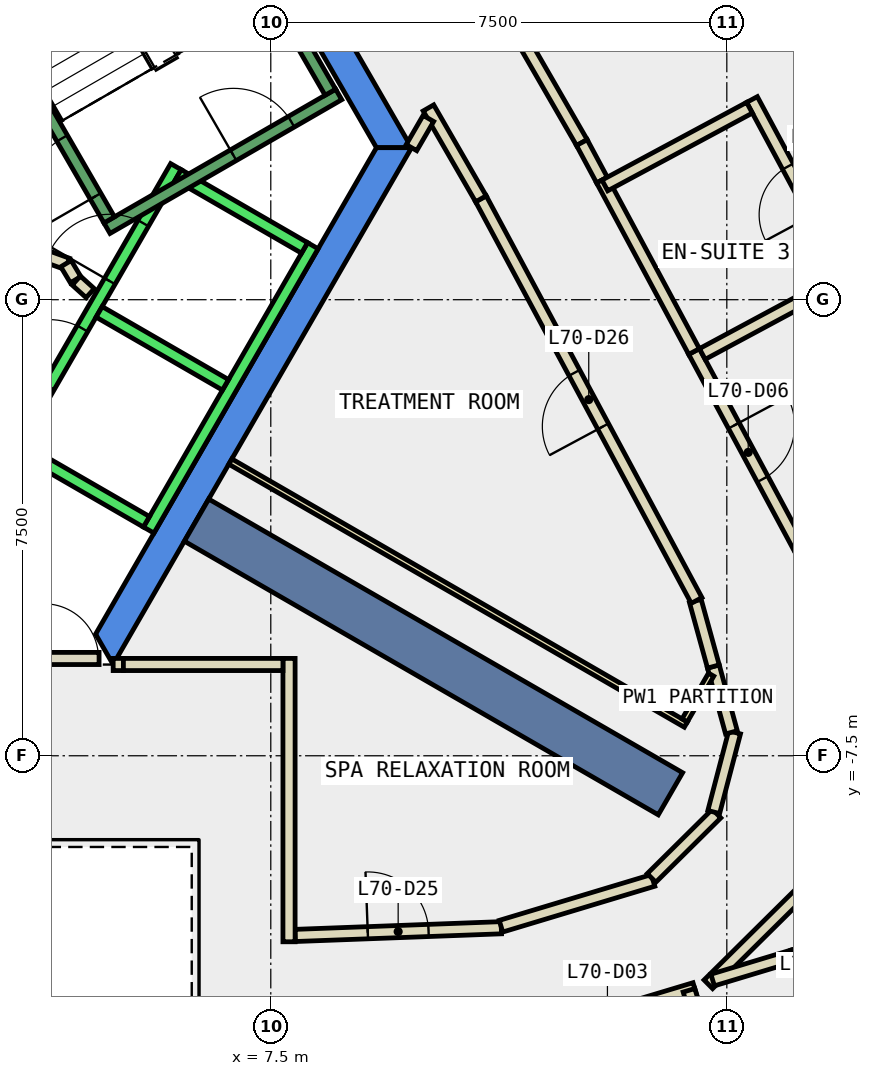
"""IFC4 building model, lengths in metres.
Left out: names, types, materials, properties, quantities, classifications, styles, units other than length and angle.
Written with IfcOpenShell. Run it as: python <this file> out.ifc"""

import sys

from ifc_helpers import new_model, si_unit, direction, frame, frame_2d, origin, place, context, subcontext, project, spatial, polyline, rectangle, outline, extrude, element, fill, save


model = new_model("IFC4")
c1 = context("Model", 3, precision=1e-05, world=origin(), true_north=direction((0.0, 1.0)))
c2 = subcontext(c1, "Body", "Model", "MODEL_VIEW")
j1 = project(units=[si_unit("LENGTHUNIT", "METRE"), si_unit("PLANEANGLEUNIT", "RADIAN")], contexts=[c1])
p1 = place(None, origin())
s1 = spatial("IfcSite", under=j1, at=p1, CompositionType="ELEMENT")
p2 = place(p1, origin())
s2 = spatial("IfcBuilding", under=s1, at=p2, CompositionType="ELEMENT")
p3 = place(p2, frame((0.0, 0.0, 300.8)))
s3 = spatial("IfcBuildingStorey", under=s2, at=p3, CompositionType="ELEMENT", Elevation=300.8)
p4 = place(p3, frame((0.0, 0.0, -0.34)))
e1 = element("IfcWall", 1, at=p4, inside=s3, PredefinedType="SHEAR", context=c2, shape_type="SweptSolid", body=[
    extrude(outline(polyline([(5.486, 9.998), (5.053, 9.748), (9.238, 2.5), (9.815, 2.5), (5.486, 9.998)])), origin(), (0.0, 0.0, 1.0), 3.6),
])
p5 = place(p3, frame((0.0, 0.0, -0.34)))
e2 = element("IfcWall", 2, at=p5, inside=s3, PredefinedType="SHEAR", context=c2, shape_type="SweptSolid", body=[
    extrude(outline(polyline([(4.907, -6.0), (9.815, 2.5), (9.238, 2.5), (4.619, -5.5), (4.907, -6.0)])), origin(), (0.0, 0.0, 1.0), 3.6),
])
p6 = place(p3, frame((6.279, -3.625, -0.34), z_axis=(0.0, 0.0, 1.0), x_axis=(0.866017533419, -0.500013631625, 0.0)))
e3 = element("IfcWall", 3, at=p6, inside=s3, PredefinedType="SHEAR", context=c2, shape_type="SweptSolid", body=[
    extrude(rectangle(XDim=9.0, YDim=0.8, at=frame_2d((4.5, 0.0))), origin(), (0.0, 0.0, 1.0), 3.6),
])
p7 = place(p3, frame((7.9, -10.455, 0.0), z_axis=(0.0, 0.0, 1.0), x_axis=(0.999297278907, 0.037482640915, 0.0)))
e4 = element("IfcWall", 4, at=p7, inside=s3, PredefinedType="PARTITIONING", context=c2, shape_type="SweptSolid", body=[
    extrude(rectangle(XDim=3.394, YDim=0.2, at=frame_2d((1.697, 0.0))), origin(), (0.0, 0.0, 1.0), 3.26),
])
p8 = place(p7, frame((1.196, 0.0, 0.0)))
e5 = element("IfcOpeningElement", 5, at=p8, cuts=e4, PredefinedType="OPENING", context=c2, shape_type="SweptSolid", body=[
    extrude(rectangle(XDim=1.0, YDim=2.1, at=frame_2d((0.5, 1.05))), frame((0.0, 0.11, 0.0), z_axis=(0.0, -1.0, 0.0), x_axis=(1.0, 0.0, 0.0)), (0.0, 0.0, 1.0), 0.22),
])
p9 = place(p3, frame((11.286, -10.303, 0.0), z_axis=(0.0, 0.0, 1.0), x_axis=(0.957555754851, 0.288248115955, 0.0)))
e6 = element("IfcWall", 6, at=p9, inside=s3, PredefinedType="PARTITIONING", context=c2, shape_type="SweptSolid", body=[
    extrude(rectangle(XDim=2.612, YDim=0.2, at=frame_2d((1.306, 0.0))), origin(), (0.0, 0.0, 1.0), 3.26),
])
p10 = place(p3, frame((13.762, -9.509, 0.0), z_axis=(0.0, 0.0, 1.0), x_axis=(0.710749293824, 0.703445407497, 0.0)))
e7 = element("IfcWall", 7, at=p10, inside=s3, PredefinedType="PARTITIONING", context=c2, shape_type="SweptSolid", body=[
    extrude(rectangle(XDim=1.504, YDim=0.2, at=frame_2d((0.752, 0.0))), origin(), (0.0, 0.0, 1.0), 3.26),
])
p11 = place(p3, frame((14.785, -8.425, 0.0), z_axis=(0.0, 0.0, 1.0), x_axis=(0.253295121261, 0.967389053869, 0.0)))
e8 = element("IfcWall", 8, at=p11, inside=s3, PredefinedType="PARTITIONING", context=c2, shape_type="SweptSolid", body=[
    extrude(rectangle(XDim=1.354, YDim=0.2, at=frame_2d((0.677, 0.0))), origin(), (0.0, 0.0, 1.0), 3.26),
])
p12 = place(p3, frame((15.076, -7.115, 0.0), z_axis=(0.0, 0.0, 1.0), x_axis=(-0.264368116744, 0.964421846937, 0.0)))
e9 = element("IfcWall", 9, at=p12, inside=s3, PredefinedType="PARTITIONING", context=c2, shape_type="SweptSolid", body=[
    extrude(rectangle(XDim=1.123, YDim=0.2, at=frame_2d((0.562, 0.0))), origin(), (0.0, 0.0, 1.0), 3.26),
])
p13 = place(p3, frame((14.779, -6.032, 0.0), z_axis=(0.0, 0.0, 1.0), x_axis=(-0.265740072272, 0.964044715762, 0.0)))
e10 = element("IfcWall", 10, at=p13, inside=s3, PredefinedType="PARTITIONING", context=c2, shape_type="SweptSolid", body=[
    extrude(rectangle(XDim=1.118, YDim=0.2, at=frame_2d((0.559, 0.0))), origin(), (0.0, 0.0, 1.0), 3.26),
])
p14 = place(p3, frame((14.503, -4.946, 0.0), z_axis=(0.0, 0.0, 1.0), x_axis=(-0.473101362557, 0.881008002658, 0.0)))
e11 = element("IfcWall", 11, at=p14, inside=s3, PredefinedType="PARTITIONING", context=c2, shape_type="SweptSolid", body=[
    extrude(rectangle(XDim=7.497, YDim=0.2, at=frame_2d((3.749, 0.0))), origin(), (0.0, 0.0, 1.0), 3.26),
])
p15 = place(p14, frame((3.249, 0.0, 0.0)))
e12 = element("IfcOpeningElement", 12, at=p15, cuts=e11, PredefinedType="OPENING", context=c2, shape_type="SweptSolid", body=[
    extrude(rectangle(XDim=1.0, YDim=2.1, at=frame_2d((0.5, 1.05))), frame((0.0, 0.11, 0.0), z_axis=(0.0, -1.0, 0.0), x_axis=(1.0, 0.0, 0.0)), (0.0, 0.0, 1.0), 0.22),
])
p16 = place(p3, frame((10.956, 1.659, 0.0), z_axis=(0.0, 0.0, 1.0), x_axis=(-0.49992648901, 0.866067841215, 0.0)))
e13 = element("IfcWall", 13, at=p16, inside=s3, PredefinedType="PARTITIONING", context=c2, shape_type="SweptSolid", body=[
    extrude(rectangle(XDim=1.726, YDim=0.2, at=frame_2d((0.863, 0.0))), origin(), (0.0, 0.0, 1.0), 3.26),
])
p17 = place(p3, frame((10.092, 2.981, 0.0), z_axis=(0.0, 0.0, 1.0), x_axis=(-0.501296484717, -0.865275582927, 0.0)))
e14 = element("IfcWall", 14, at=p17, inside=s3, PredefinedType="PARTITIONING", context=c2, shape_type="SweptSolid", body=[
    extrude(rectangle(XDim=0.555, YDim=0.2, at=frame_2d((0.277, 0.0))), origin(), (0.0, 0.0, 1.0), 3.26),
])
p18 = place(p3, frame((14.473, -11.328, 0.0), z_axis=(0.0, 0.0, 1.0), x_axis=(-0.957599689503, -0.288102125406, 0.0)))
e15 = element("IfcWall", 15, at=p18, inside=s3, PredefinedType="PARTITIONING", context=c2, shape_type="SweptSolid", body=[
    extrude(rectangle(XDim=2.999, YDim=0.2, at=frame_2d((1.5, 0.0))), origin(), (0.0, 0.0, 1.0), 3.26),
])
p19 = place(p18, frame((1.0, 0.0, 0.0)))
e16 = element("IfcOpeningElement", 16, at=p19, cuts=e15, PredefinedType="OPENING", context=c2, shape_type="SweptSolid", body=[
    extrude(rectangle(XDim=1.0, YDim=2.1, at=frame_2d((0.5, 1.05))), frame((0.0, 0.11, 0.0), z_axis=(0.0, -1.0, 0.0), x_axis=(1.0, 0.0, 0.0)), (0.0, 0.0, 1.0), 0.22),
])
p20 = place(p3, frame((16.537, -9.436, 0.0), z_axis=(0.0, 0.0, 1.0), x_axis=(-0.710773151724, -0.703421301063, 0.0)))
e17 = element("IfcWall", 17, at=p20, inside=s3, PredefinedType="PARTITIONING", context=c2, shape_type="SweptSolid", body=[
    extrude(rectangle(XDim=2.59, YDim=0.2, at=frame_2d((1.295, 0.0))), origin(), (0.0, 0.0, 1.0), 3.26),
])
p21 = place(p3, frame((14.461, -0.852, 0.0), z_axis=(0.0, 0.0, 1.0), x_axis=(0.473160180459, -0.88097641491, 0.0)))
e18 = element("IfcWall", 18, at=p21, inside=s3, PredefinedType="PARTITIONING", context=c2, shape_type="SweptSolid", body=[
    extrude(rectangle(XDim=3.766, YDim=0.2, at=frame_2d((1.883, 0.0))), origin(), (0.0, 0.0, 1.0), 3.26),
])
p22 = place(p21, frame((1.383, 0.0, 0.0)))
e19 = element("IfcOpeningElement", 19, at=p22, cuts=e18, PredefinedType="OPENING", context=c2, shape_type="SweptSolid", body=[
    extrude(rectangle(XDim=1.0, YDim=2.1, at=frame_2d((0.5, 1.05))), frame((0.0, 0.11, 0.0), z_axis=(0.0, -1.0, 0.0), x_axis=(1.0, 0.0, 0.0)), (0.0, 0.0, 1.0), 0.22),
])
p23 = place(p3, frame((10.618, 6.044, 0.0), z_axis=(0.0, 0.0, 1.0), x_axis=(0.50008212199, -0.86597798544, 0.0)))
e20 = element("IfcWall", 20, at=p23, inside=s3, PredefinedType="PARTITIONING", context=c2, shape_type="SweptSolid", body=[
    extrude(rectangle(XDim=3.995, YDim=0.2, at=frame_2d((1.998, 0.0))), origin(), (0.0, 0.0, 1.0), 3.26),
])
p24 = place(p3, frame((12.616, 2.584, 0.0), z_axis=(0.0, 0.0, 1.0), x_axis=(0.472830911699, -0.881153181315, 0.0)))
e21 = element("IfcWall", 21, at=p24, inside=s3, PredefinedType="PARTITIONING", context=c2, shape_type="SweptSolid", body=[
    extrude(rectangle(XDim=0.7, YDim=0.2, at=frame_2d((0.35, 0.0))), origin(), (0.0, 0.0, 1.0), 3.26),
])
p25 = place(p3, frame((12.947, 1.967, 0.0), z_axis=(0.0, 0.0, 1.0), x_axis=(0.473116768279, -0.88099972961, 0.0)))
e22 = element("IfcWall", 22, at=p25, inside=s3, PredefinedType="PARTITIONING", context=c2, shape_type="SweptSolid", body=[
    extrude(rectangle(XDim=3.2, YDim=0.2, at=frame_2d((1.6, 0.0))), origin(), (0.0, 0.0, 1.0), 3.26),
])
p26 = place(p3, frame((3.838, 0.702, 0.0), z_axis=(0.0, 0.0, 1.0), x_axis=(0.941035081519, -0.338308993895, 0.0)))
e23 = element("IfcWall", 23, at=p26, inside=s3, PredefinedType="PARTITIONING", context=c2, shape_type="SweptSolid", body=[
    extrude(rectangle(XDim=0.337, YDim=0.2, at=frame_2d((0.168, 0.0))), origin(), (0.0, 0.0, 1.0), 3.26),
])
p27 = place(p3, frame((4.132, 0.593, 0.0), z_axis=(0.0, 0.0, 1.0), x_axis=(0.513561617048, -0.858052717201, 0.0)))
e24 = element("IfcWall", 24, at=p27, inside=s3, PredefinedType="PARTITIONING", context=c2, shape_type="SweptSolid", body=[
    extrude(rectangle(XDim=0.308, YDim=0.2, at=frame_2d((0.154, 0.0))), origin(), (0.0, 0.0, 1.0), 3.26),
])
p28 = place(p3, frame((4.301, 0.315, 0.0), z_axis=(0.0, 0.0, 1.0), x_axis=(0.741798017506, -0.670623367639, 0.0)))
e25 = element("IfcWall", 25, at=p28, inside=s3, PredefinedType="PARTITIONING", context=c2, shape_type="SweptSolid", body=[
    extrude(rectangle(XDim=0.309, YDim=0.2, at=frame_2d((0.154, 0.0))), origin(), (0.0, 0.0, 1.0), 3.26),
])
p29 = place(p3, frame((4.908, -5.999, 0.0), z_axis=(0.0, 0.0, 1.0), x_axis=(1.0, 0.0, 0.0)))
e26 = element("IfcWall", 26, at=p29, inside=s3, PredefinedType="PARTITIONING", context=c2, shape_type="SweptSolid", body=[
    extrude(rectangle(XDim=0.168, YDim=0.2, at=frame_2d((0.084, 0.0))), origin(), (0.0, 0.0, 1.0), 2.4),
])
p30 = place(p3, frame((7.8, -5.899, 0.0), z_axis=(0.0, 0.0, 1.0), x_axis=(0.0, -1.0, 0.0)))
e27 = element("IfcWall", 27, at=p30, inside=s3, PredefinedType="PARTITIONING", context=c2, shape_type="SweptSolid", body=[
    extrude(rectangle(XDim=4.66, YDim=0.2, at=frame_2d((2.33, 0.0))), origin(), (0.0, 0.0, 1.0), 3.26),
])
p31 = place(p3, frame((6.835, -2.662, 0.0), z_axis=(0.0, 0.0, 1.0), x_axis=(0.866023427642, -0.500003422764, 0.0)))
e28 = element("IfcWall", 28, at=p31, inside=s3, PredefinedType="PARTITIONING", context=c2, shape_type="SweptSolid", body=[
    extrude(rectangle(XDim=8.65, YDim=0.1, at=frame_2d((4.325, 0.0))), origin(), (0.0, 0.0, 1.0), 3.26),
])
p32 = place(p3, frame((14.307, -6.919, 0.0), z_axis=(0.0, 0.0, 1.0), x_axis=(0.500305662732, 0.865848857387, 0.0)))
e29 = element("IfcWall", 29, at=p32, inside=s3, PredefinedType="PARTITIONING", context=c2, shape_type="SweptSolid", body=[
    extrude(rectangle(XDim=0.87, YDim=0.1, at=frame_2d((0.435, 0.0))), origin(), (0.0, 0.0, 1.0), 3.26),
])
p33 = place(p3, frame((14.378, -11.357, 0.0), z_axis=(0.0, 0.0, 1.0), x_axis=(0.287932252498, -0.957650780802, 0.0)))
e30 = element("IfcWall", 30, at=p33, inside=s3, PredefinedType="PARTITIONING", context=c2, shape_type="SweptSolid", body=[
    extrude(rectangle(XDim=2.3, YDim=0.2, at=frame_2d((1.15, 0.0))), origin(), (0.0, 0.0, 1.0), 3.26),
])
p34 = place(p3, frame((16.917, -13.203, 0.0), z_axis=(0.0, 0.0, 1.0), x_axis=(-0.287998855134, 0.957630753183, 0.0)))
e31 = element("IfcWall", 31, at=p34, inside=s3, PredefinedType="PARTITIONING", context=c2, shape_type="SweptSolid", body=[
    extrude(rectangle(XDim=2.649, YDim=0.2, at=frame_2d((1.325, 0.0))), origin(), (0.0, 0.0, 1.0), 3.26),
])
p35 = place(p34, frame((0.875, 0.0, 0.0)))
e32 = element("IfcOpeningElement", 32, at=p35, cuts=e31, PredefinedType="OPENING", context=c2, shape_type="SweptSolid", body=[
    extrude(rectangle(XDim=0.9, YDim=2.1, at=frame_2d((0.45, 1.05))), frame((0.0, 0.11, 0.0), z_axis=(0.0, -1.0, 0.0), x_axis=(1.0, 0.0, 0.0)), (0.0, 0.0, 1.0), 0.22),
])
p36 = place(p3, frame((16.087, -10.79, 0.0), z_axis=(0.0, 0.0, 1.0), x_axis=(-0.957425655367, -0.288679951581, 0.0)))
e33 = element("IfcWall", 33, at=p36, inside=s3, PredefinedType="PARTITIONING", context=c2, shape_type="SweptSolid", body=[
    extrude(rectangle(XDim=1.378, YDim=0.2, at=frame_2d((0.689, 0.0))), origin(), (0.0, 0.0, 1.0), 3.26),
])
p37 = place(p3, frame((14.597, -0.893, 0.0), z_axis=(0.0, 0.0, 1.0), x_axis=(0.880971229432, 0.473169835168, 0.0)))
e34 = element("IfcWall", 34, at=p37, inside=s3, PredefinedType="PARTITIONING", context=c2, shape_type="SweptSolid", body=[
    extrude(rectangle(XDim=2.599, YDim=0.2, at=frame_2d((1.3, 0.0))), origin(), (0.0, 0.0, 1.0), 3.26),
])
p38 = place(p3, frame((17.023, 0.297, 0.0), z_axis=(0.0, 0.0, 1.0), x_axis=(-0.473247398557, 0.88092956572, 0.0)))
e35 = element("IfcWall", 35, at=p38, inside=s3, PredefinedType="PARTITIONING", context=c2, shape_type="SweptSolid", body=[
    extrude(rectangle(XDim=3.4, YDim=0.2, at=frame_2d((1.7, 0.0))), origin(), (0.0, 0.0, 1.0), 3.26),
])
p39 = place(p38, frame((1.25, 0.0, 0.0)))
e36 = element("IfcOpeningElement", 36, at=p39, cuts=e35, PredefinedType="OPENING", context=c2, shape_type="SweptSolid", body=[
    extrude(rectangle(XDim=0.9, YDim=2.1, at=frame_2d((0.45, 1.05))), frame((0.0, 0.11, 0.0), z_axis=(0.0, -1.0, 0.0), x_axis=(1.0, 0.0, 0.0)), (0.0, 0.0, 1.0), 0.22),
])
p40 = place(p3, frame((15.373, 3.157, 0.0), z_axis=(0.0, 0.0, 1.0), x_axis=(-0.880935111027, -0.473237076062, 0.0)))
e37 = element("IfcWall", 37, at=p40, inside=s3, PredefinedType="PARTITIONING", context=c2, shape_type="SweptSolid", body=[
    extrude(rectangle(XDim=2.701, YDim=0.2, at=frame_2d((1.35, 0.0))), origin(), (0.0, 0.0, 1.0), 3.26),
])
p41 = place(p3, frame((3.75, -5.9, 0.0), z_axis=(0.0, 0.0, 1.0), x_axis=(1.0, 0.0, 0.0)))
e38 = element("IfcWall", 38, at=p41, inside=s3, PredefinedType="PARTITIONING", context=c2, shape_type="SweptSolid", body=[
    extrude(rectangle(XDim=0.926, YDim=0.2, at=frame_2d((0.463, 0.0))), origin(), (0.0, 0.0, 1.0), 2.4),
])
p42 = place(p41, frame((0.017, 0.0, 0.0)))
e39 = element("IfcOpeningElement", 39, at=p42, cuts=e38, PredefinedType="OPENING", context=c2, shape_type="SweptSolid", body=[
    extrude(rectangle(XDim=0.9, YDim=2.1, at=frame_2d((0.45, 1.05))), frame((0.0, 0.11, 0.0), z_axis=(0.0, -1.0, 0.0), x_axis=(1.0, 0.0, 0.0)), (0.0, 0.0, 1.0), 0.22),
])
p43 = place(p3, frame((5.076, -5.999, 0.0), z_axis=(0.0, 0.0, 1.0), x_axis=(1.0, 0.0, 0.0)))
e40 = element("IfcWall", 40, at=p43, inside=s3, PredefinedType="PARTITIONING", context=c2, shape_type="SweptSolid", body=[
    extrude(rectangle(XDim=2.624, YDim=0.2, at=frame_2d((1.312, 0.0))), origin(), (0.0, 0.0, 1.0), 3.26),
])
p44 = place(p3, frame((3.24, -2.488, 0.0), z_axis=(0.0, 0.0, 1.0), x_axis=(0.500034260056, 0.866005622828, 0.0)))
e41 = element("IfcWall", 41, at=p44, inside=s3, PredefinedType="STANDARD", context=c2, shape_type="SweptSolid", body=[
    extrude(rectangle(XDim=5.399, YDim=0.2, at=frame_2d((2.7, 0.0))), origin(), (0.0, 0.0, 1.0), 3.26),
])
p45 = place(p44, frame((3.225, 0.0, 0.0)))
e42 = element("IfcOpeningElement", 42, at=p45, cuts=e41, PredefinedType="OPENING", context=c2, shape_type="SweptSolid", body=[
    extrude(rectangle(XDim=1.1, YDim=2.1, at=frame_2d((0.55, 1.05))), frame((0.0, 0.11, 0.0), z_axis=(0.0, -1.0, 0.0), x_axis=(1.0, 0.0, 0.0)), (0.0, 0.0, 1.0), 0.22),
])
p46 = place(p44, frame((1.225, 0.0, 0.0)))
e43 = element("IfcOpeningElement", 43, at=p46, cuts=e41, PredefinedType="OPENING", context=c2, shape_type="SweptSolid", body=[
    extrude(rectangle(XDim=1.1, YDim=2.1, at=frame_2d((0.55, 1.05))), frame((0.0, 0.11, 0.0), z_axis=(0.0, -1.0, 0.0), x_axis=(1.0, 0.0, 0.0)), (0.0, 0.0, 1.0), 0.22),
])
p47 = place(p3, frame((5.492, -3.788, 0.0), z_axis=(0.0, 0.0, 1.0), x_axis=(0.500034260056, 0.866005622828, 0.0)))
e44 = element("IfcWall", 44, at=p47, inside=s3, PredefinedType="STANDARD", context=c2, shape_type="SweptSolid", body=[
    extrude(rectangle(XDim=5.399, YDim=0.2, at=frame_2d((2.7, 0.0))), origin(), (0.0, 0.0, 1.0), 3.26),
])
p48 = place(p3, frame((3.377, -2.452, 0.0), z_axis=(0.0, 0.0, 1.0), x_axis=(0.865955154139, -0.50012165622, 0.0)))
e45 = element("IfcWall", 45, at=p48, inside=s3, PredefinedType="STANDARD", context=c2, shape_type="SweptSolid", body=[
    extrude(rectangle(XDim=2.4, YDim=0.2, at=frame_2d((1.2, 0.0))), origin(), (0.0, 0.0, 1.0), 3.26),
])
for number, where, z_axis, x_axis in (
    (46, (4.677, -0.2, 0.0), (0.0, 0.0, 1.0), (0.866, -0.5, 0.0)),
    (47, (5.977, 2.052, 0.0), (0.0, 0.0, 1.0), (0.866, -0.5, 0.0)),
):
    element("IfcWall", number, at=place(p3, frame(where, z_axis=z_axis, x_axis=x_axis)), inside=s3, PredefinedType="STANDARD", context=c2, shape_type="SweptSolid", body=[
        extrude(rectangle(XDim=2.399, YDim=0.2, at=frame_2d((1.2, 0.0))), origin(), (0.0, 0.0, 1.0), 3.26),
    ])
p49 = place(p3, frame((4.806, 1.176, 0.0), z_axis=(0.0, 0.0, 1.0), x_axis=(0.866059941101, 0.499940174841, 0.0)))
e48 = element("IfcWall", 48, at=p49, inside=s3, PredefinedType="STANDARD", context=c2, shape_type="SweptSolid", body=[
    extrude(rectangle(XDim=4.4, YDim=0.2, at=frame_2d((2.2, 0.0))), origin(), (0.0, 0.0, 1.0), 3.26),
])
p50 = place(p49, frame((2.4, 0.0, 0.0)))
e49 = element("IfcOpeningElement", 49, at=p50, cuts=e48, PredefinedType="OPENING", context=c2, shape_type="SweptSolid", body=[
    extrude(rectangle(XDim=1.1, YDim=2.2, at=frame_2d((0.55, 1.1))), frame((0.0, 0.11, 0.0), z_axis=(0.0, -1.0, 0.0), x_axis=(1.0, 0.0, 0.0)), (0.0, 0.0, 1.0), 0.22),
])
p51 = place(p3, frame((4.843, 1.312, 0.0), z_axis=(0.0, 0.0, 1.0), x_axis=(-0.499963383562, 0.866046543262, 0.0)))
e50 = element("IfcWall", 50, at=p51, inside=s3, PredefinedType="STANDARD", context=c2, shape_type="SweptSolid", body=[
    extrude(rectangle(XDim=6.9, YDim=0.2, at=frame_2d((3.45, 0.0))), origin(), (0.0, 0.0, 1.0), 3.26),
])
p52 = place(p51, frame((0.45, 0.0, 0.0)))
e51 = element("IfcOpeningElement", 51, at=p52, cuts=e50, PredefinedType="OPENING", context=c2, shape_type="SweptSolid", body=[
    extrude(rectangle(XDim=1.1, YDim=2.2, at=frame_2d((0.55, 1.1))), frame((0.0, 0.11, 0.0), z_axis=(0.0, -1.0, 0.0), x_axis=(1.0, 0.0, 0.0)), (0.0, 0.0, 1.0), 0.22),
])
p53 = place(p3, frame((8.48, 3.412, 0.0), z_axis=(0.0, 0.0, 1.0), x_axis=(-0.499978703459, 0.866037698999, 0.0)))
e52 = element("IfcWall", 52, at=p53, inside=s3, PredefinedType="STANDARD", context=c2, shape_type="SweptSolid", body=[
    extrude(rectangle(XDim=6.9, YDim=0.2, at=frame_2d((3.45, 0.0))), origin(), (0.0, 0.0, 1.0), 3.26),
])
p54 = place(p22, origin())
e53 = element("IfcDoor", 53, at=p54, inside=s3, OperationType="SINGLE_SWING_LEFT", PredefinedType="DOOR", context=c2, shape_type="SweptSolid", body=[
    extrude(rectangle(XDim=1.0, YDim=2.1, at=frame_2d((0.5, 1.05))), frame((0.0, 0.025, 0.0), z_axis=(0.0, -1.0, 0.0), x_axis=(1.0, 0.0, 0.0)), (0.0, 0.0, 1.0), 0.05),
])
fill(e19, e53)
p55 = place(p39, origin())
e54 = element("IfcDoor", 54, at=p55, inside=s3, OperationType="SINGLE_SWING_LEFT", PredefinedType="DOOR", context=c2, shape_type="SweptSolid", body=[
    extrude(rectangle(XDim=0.9, YDim=2.1, at=frame_2d((0.45, 1.05))), frame((0.0, 0.025, 0.0), z_axis=(0.0, -1.0, 0.0), x_axis=(1.0, 0.0, 0.0)), (0.0, 0.0, 1.0), 0.05),
])
fill(e36, e54)
p56 = place(p8, origin())
e55 = element("IfcDoor", 55, at=p56, inside=s3, OperationType="SINGLE_SWING_LEFT", PredefinedType="DOOR", context=c2, shape_type="SweptSolid", body=[
    extrude(rectangle(XDim=1.0, YDim=2.1, at=frame_2d((0.5, 1.05))), frame((0.0, 0.025, 0.0), z_axis=(0.0, -1.0, 0.0), x_axis=(1.0, 0.0, 0.0)), (0.0, 0.0, 1.0), 0.05),
])
fill(e5, e55)
p57 = place(p15, origin())
e56 = element("IfcDoor", 56, at=p57, inside=s3, OperationType="SINGLE_SWING_LEFT", PredefinedType="DOOR", context=c2, shape_type="SweptSolid", body=[
    extrude(rectangle(XDim=1.0, YDim=2.1, at=frame_2d((0.5, 1.05))), frame((0.0, 0.025, 0.0), z_axis=(0.0, -1.0, 0.0), x_axis=(1.0, 0.0, 0.0)), (0.0, 0.0, 1.0), 0.05),
])
fill(e12, e56)
p58 = place(p42, origin())
e57 = element("IfcDoor", 57, at=p58, inside=s3, OperationType="SINGLE_SWING_LEFT", PredefinedType="DOOR", context=c2, shape_type="SweptSolid", body=[
    extrude(rectangle(XDim=0.9, YDim=2.1, at=frame_2d((0.45, 1.05))), frame((0.0, 0.025, 0.0), z_axis=(0.0, -1.0, 0.0), x_axis=(1.0, 0.0, 0.0)), (0.0, 0.0, 1.0), 0.05),
])
fill(e39, e57)
p59 = place(p45, origin())
e58 = element("IfcDoor", 58, at=p59, inside=s3, OperationType="SLIDING_TO_LEFT", PredefinedType="DOOR", context=c2, shape_type="SweptSolid", body=[
    extrude(rectangle(XDim=1.1, YDim=2.1, at=frame_2d((0.55, 1.05))), frame((0.0, 0.025, 0.0), z_axis=(0.0, -1.0, 0.0), x_axis=(1.0, 0.0, 0.0)), (0.0, 0.0, 1.0), 0.05),
])
fill(e42, e58)
p60 = place(p46, origin())
e59 = element("IfcDoor", 59, at=p60, inside=s3, OperationType="SLIDING_TO_LEFT", PredefinedType="DOOR", context=c2, shape_type="SweptSolid", body=[
    extrude(rectangle(XDim=1.1, YDim=2.1, at=frame_2d((0.55, 1.05))), frame((0.0, 0.025, 0.0), z_axis=(0.0, -1.0, 0.0), x_axis=(1.0, 0.0, 0.0)), (0.0, 0.0, 1.0), 0.05),
])
fill(e43, e59)
p61 = place(p52, origin())
e60 = element("IfcDoor", 60, at=p61, inside=s3, OperationType="SINGLE_SWING_LEFT", PredefinedType="DOOR", context=c2, shape_type="SweptSolid", body=[
    extrude(rectangle(XDim=1.1, YDim=2.2, at=frame_2d((0.55, 1.1))), frame((0.0, 0.025, 0.0), z_axis=(0.0, -1.0, 0.0), x_axis=(1.0, 0.0, 0.0)), (0.0, 0.0, 1.0), 0.05),
])
fill(e51, e60)
p62 = place(p50, origin())
e61 = element("IfcDoor", 61, at=p62, inside=s3, OperationType="SINGLE_SWING_LEFT", PredefinedType="DOOR", context=c2, shape_type="SweptSolid", body=[
    extrude(rectangle(XDim=1.1, YDim=2.2, at=frame_2d((0.55, 1.1))), frame((0.0, 0.025, 0.0), z_axis=(0.0, -1.0, 0.0), x_axis=(1.0, 0.0, 0.0)), (0.0, 0.0, 1.0), 0.05),
])
fill(e49, e61)
save(model, sys.argv[1])
